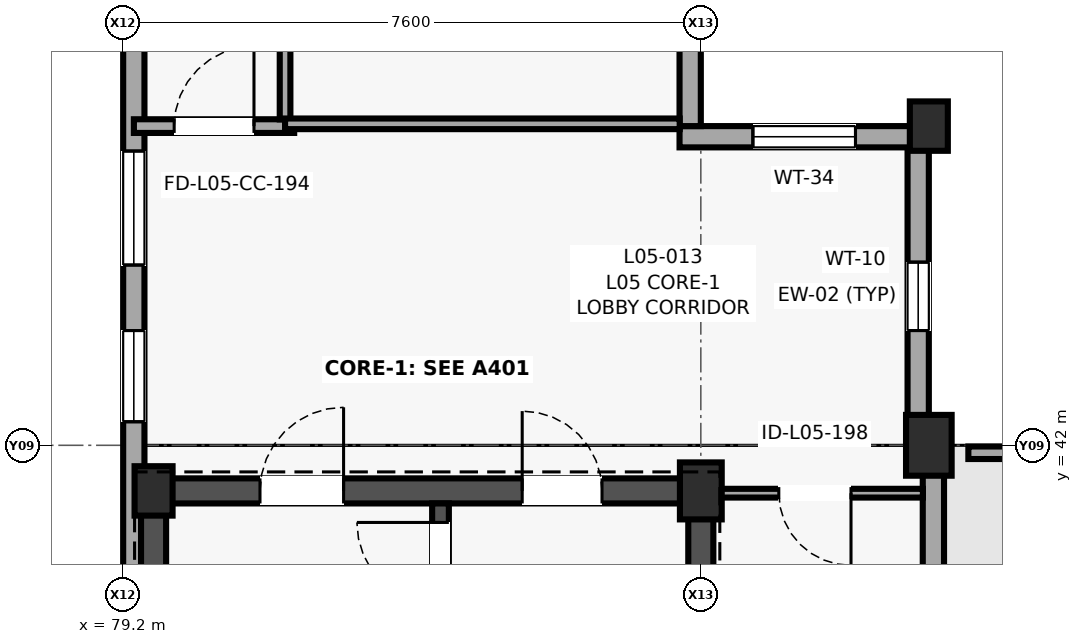
"""IFC4 building model, lengths in metres.
Left out: names, types, materials, properties, quantities, classifications, styles, units other than length and angle.
Written with IfcOpenShell. Run it as: python <this file> out.ifc"""

import sys

from ifc_helpers import new_model, si_unit, direction, frame, frame_2d, origin, origin_2d, place, context, subcontext, project, spatial, polyline, rectangle, outline, extrude, element, fill, save


model = new_model("IFC4")
c1 = context("Model", 3, precision=1e-05, world=origin(), true_north=direction((0.0, 1.0)))
c2 = subcontext(c1, "Body", "Model", "MODEL_VIEW")
j1 = project(units=[si_unit("LENGTHUNIT", "METRE"), si_unit("PLANEANGLEUNIT", "RADIAN")], contexts=[c1])
p1 = place(None, origin())
s1 = spatial("IfcSite", under=j1, at=p1, CompositionType="ELEMENT")
p2 = place(p1, origin())
s2 = spatial("IfcBuilding", under=s1, at=p2, CompositionType="ELEMENT")
p3 = place(p2, frame((0.0, 0.0, 20.2)))
s3 = spatial("IfcBuildingStorey", under=s2, at=p3, CompositionType="ELEMENT", Elevation=20.2)
p4 = place(p3, frame((79.6, 41.4, 0.0), z_axis=(0.0, 0.0, 1.0), x_axis=(1.0, 0.0, 0.0)))
e1 = element("IfcColumn", 1, at=p4, inside=s3, PredefinedType="COLUMN", context=c2, shape_type="SweptSolid", body=[
    extrude(rectangle(XDim=0.5, YDim=0.65, at=origin_2d()), origin(), (0.0, 0.0, 1.0), 4.0),
])
p5 = place(p3, frame((86.8, 41.4, 0.0), z_axis=(0.0, 0.0, 1.0), x_axis=(1.0, 0.0, 0.0)))
e2 = element("IfcColumn", 2, at=p5, inside=s3, PredefinedType="COLUMN", context=c2, shape_type="SweptSolid", body=[
    extrude(rectangle(XDim=0.55, YDim=0.75, at=origin_2d()), origin(), (0.0, 0.0, 1.0), 4.0),
])
p6 = place(p3, frame((89.8, 42.0, 0.0), z_axis=(0.0, 0.0, 1.0), x_axis=(1.0, 0.0, 0.0)))
e3 = element("IfcColumn", 3, at=p6, inside=s3, PredefinedType="COLUMN", context=c2, shape_type="SweptSolid", body=[
    extrude(rectangle(XDim=0.6, YDim=0.8, at=origin_2d()), origin(), (0.0, 0.0, 1.0), 4.0),
])
p7 = place(p3, frame((89.8, 46.2, 0.0), z_axis=(0.0, 0.0, 1.0), x_axis=(1.0, 0.0, 0.0)))
e4 = element("IfcColumn", 4, at=p7, inside=s3, PredefinedType="COLUMN", context=c2, shape_type="SweptSolid", body=[
    extrude(rectangle(XDim=0.5, YDim=0.65, at=origin_2d()), origin(), (0.0, 0.0, 1.0), 4.0),
])
p8 = place(p3, frame((89.66, 42.0, 0.0), z_axis=(0.0, 0.0, 1.0), x_axis=(0.0, 1.0, 0.0)))
e5 = element("IfcWall", 5, at=p8, inside=s3, PredefinedType="SOLIDWALL", context=c2, shape_type="SweptSolid", body=[
    extrude(rectangle(XDim=3.92, YDim=0.28, at=frame_2d((1.96, 0.0))), origin(), (0.0, 0.0, 1.0), 3.255),
])
p9 = place(p8, frame((1.51, 0.0, 1.05)))
e6 = element("IfcOpeningElement", 6, at=p9, cuts=e5, PredefinedType="OPENING", context=c2, shape_type="SweptSolid", body=[
    extrude(rectangle(XDim=0.9, YDim=0.9, at=frame_2d((0.45, 0.45))), frame((0.0, 0.15, 0.0), z_axis=(0.0, -1.0, 0.0), x_axis=(1.0, 0.0, 0.0)), (0.0, 0.0, 1.0), 0.3),
])
p10 = place(p3, frame((89.8, 46.06, 0.0), z_axis=(0.0, 0.0, 1.0), x_axis=(-1.0, 0.0, 0.0)))
e7 = element("IfcWall", 7, at=p10, inside=s3, PredefinedType="SOLIDWALL", context=c2, shape_type="SweptSolid", body=[
    extrude(rectangle(XDim=3.28, YDim=0.28, at=frame_2d((1.64, 0.0))), origin(), (0.0, 0.0, 1.0), 3.78),
])
p11 = place(p10, frame((0.965, 0.0, 1.05)))
e8 = element("IfcOpeningElement", 8, at=p11, cuts=e7, PredefinedType="OPENING", context=c2, shape_type="SweptSolid", body=[
    extrude(rectangle(XDim=1.35, YDim=1.2, at=frame_2d((0.675, 0.6))), frame((0.0, 0.15, 0.0), z_axis=(0.0, -1.0, 0.0), x_axis=(1.0, 0.0, 0.0)), (0.0, 0.0, 1.0), 0.3),
])
p12 = place(p3, frame((86.66, 46.2, 0.0), z_axis=(0.0, 0.0, 1.0), x_axis=(0.0, 1.0, 0.0)))
e9 = element("IfcWall", 9, at=p12, inside=s3, PredefinedType="SOLIDWALL", context=c2, shape_type="SweptSolid", body=[
    extrude(rectangle(XDim=11.1, YDim=0.28, at=frame_2d((5.55, 0.0))), origin(), (0.0, 0.0, 1.0), 3.205),
])
p13 = place(p12, frame((1.025, 0.0, 1.05)))
e10 = element("IfcOpeningElement", 10, at=p13, cuts=e9, PredefinedType="OPENING", context=c2, shape_type="SweptSolid", body=[
    extrude(rectangle(XDim=1.65, YDim=1.25, at=frame_2d((0.825, 0.625))), frame((0.0, 0.15, 0.0), z_axis=(0.0, -1.0, 0.0), x_axis=(1.0, 0.0, 0.0)), (0.0, 0.0, 1.0), 0.3),
])
p14 = place(p12, frame((4.625, 0.0, 1.05)))
e11 = element("IfcOpeningElement", 11, at=p14, cuts=e9, PredefinedType="OPENING", context=c2, shape_type="SweptSolid", body=[
    extrude(rectangle(XDim=1.85, YDim=1.4, at=frame_2d((0.925, 0.7))), frame((0.0, 0.15, 0.0), z_axis=(0.0, -1.0, 0.0), x_axis=(1.0, 0.0, 0.0)), (0.0, 0.0, 1.0), 0.3),
])
p15 = place(p12, frame((8.5, 0.0, 0.75)))
e12 = element("IfcOpeningElement", 12, at=p15, cuts=e9, PredefinedType="OPENING", context=c2, shape_type="SweptSolid", body=[
    extrude(rectangle(XDim=1.5, YDim=2.2, at=frame_2d((0.75, 1.1))), frame((0.0, 0.15, 0.0), z_axis=(0.0, -1.0, 0.0), x_axis=(1.0, 0.0, 0.0)), (0.0, 0.0, 1.0), 0.3),
])
p16 = place(p3, frame((79.34, 50.84, 0.0), z_axis=(0.0, 0.0, 1.0), x_axis=(0.0, -1.0, 0.0)))
e13 = element("IfcWall", 13, at=p16, inside=s3, PredefinedType="SOLIDWALL", context=c2, shape_type="SweptSolid", body=[
    extrude(rectangle(XDim=17.56, YDim=0.28, at=frame_2d((8.78, 0.0))), origin(), (0.0, 0.0, 1.0), 3.155),
])
p17 = place(p16, frame((2.056, 0.0, 0.75)))
e14 = element("IfcOpeningElement", 14, at=p17, cuts=e13, PredefinedType="OPENING", context=c2, shape_type="SweptSolid", body=[
    extrude(rectangle(XDim=1.1, YDim=2.1, at=frame_2d((0.55, 1.05))), frame((0.0, 0.15, 0.0), z_axis=(0.0, -1.0, 0.0), x_axis=(1.0, 0.0, 0.0)), (0.0, 0.0, 1.0), 0.3),
])
p18 = place(p16, frame((4.968, 0.0, 0.85)))
e15 = element("IfcOpeningElement", 15, at=p18, cuts=e13, PredefinedType="OPENING", context=c2, shape_type="SweptSolid", body=[
    extrude(rectangle(XDim=1.5, YDim=1.65, at=frame_2d((0.75, 0.825))), frame((0.0, 0.15, 0.0), z_axis=(0.0, -1.0, 0.0), x_axis=(1.0, 0.0, 0.0)), (0.0, 0.0, 1.0), 0.3),
])
p19 = place(p16, frame((7.33, 0.0, 0.85)))
e16 = element("IfcOpeningElement", 16, at=p19, cuts=e13, PredefinedType="OPENING", context=c2, shape_type="SweptSolid", body=[
    extrude(rectangle(XDim=1.2, YDim=1.65, at=frame_2d((0.6, 0.825))), frame((0.0, 0.15, 0.0), z_axis=(0.0, -1.0, 0.0), x_axis=(1.0, 0.0, 0.0)), (0.0, 0.0, 1.0), 0.3),
])
p20 = place(p3, frame((89.86, 35.522, 0.0), z_axis=(0.0, 0.0, 1.0), x_axis=(0.0, 1.0, 0.0)))
e17 = element("IfcWall", 17, at=p20, inside=s3, PredefinedType="SOLIDWALL", context=c2, shape_type="SweptSolid", body=[
    extrude(rectangle(XDim=6.198, YDim=0.28, at=frame_2d((3.099, 0.0))), origin(), (0.0, 0.0, 1.0), 3.78),
])
p21 = place(p20, frame((2.149, 0.0, 0.85)))
e18 = element("IfcOpeningElement", 18, at=p21, cuts=e17, PredefinedType="OPENING", context=c2, shape_type="SweptSolid", body=[
    extrude(rectangle(XDim=1.9, YDim=1.65, at=frame_2d((0.95, 0.825))), frame((0.0, 0.15, 0.0), z_axis=(0.0, -1.0, 0.0), x_axis=(1.0, 0.0, 0.0)), (0.0, 0.0, 1.0), 0.3),
])
p22 = place(p3, frame((93.999, 41.902, 0.0), z_axis=(0.0, 0.0, 1.0), x_axis=(-1.0, 0.0, 0.0)))
e19 = element("IfcWall", 19, at=p22, inside=s3, PredefinedType="PARAPET", context=c2, shape_type="SweptSolid", body=[
    extrude(rectangle(XDim=3.679, YDim=0.165, at=frame_2d((1.839, 0.0))), origin(), (0.0, 0.0, 1.0), 1.12),
])
p23 = place(p3, frame((89.902, 35.522, 4.0), z_axis=(0.0, 0.0, 1.0), x_axis=(0.0, 1.0, 0.0)))
e20 = element("IfcWall", 20, at=p23, inside=s3, PredefinedType="PARAPET", context=c2, shape_type="SweptSolid", body=[
    extrude(rectangle(XDim=6.283, YDim=0.195, at=frame_2d((3.142, 0.0))), origin(), (0.0, 0.0, 1.0), 1.12),
])
p24 = place(p3, frame((89.999, 41.902, 4.0), z_axis=(0.0, 0.0, 1.0), x_axis=(-1.0, 0.0, 0.0)))
e21 = element("IfcWall", 21, at=p24, inside=s3, PredefinedType="PARAPET", context=c2, shape_type="SweptSolid", body=[
    extrude(outline(polyline([(0.0, 0.0), (10.798, 0.0), (10.798, 1.12), (7.343, 1.12), (7.293, 1.46), (3.505, 1.46), (3.455, 1.12), (0.0, 1.12), (0.0, 0.0)])), frame((0.0, 0.098, 0.0), z_axis=(0.0, -1.0, 0.0), x_axis=(1.0, 0.0, 0.0)), (0.0, 0.0, 1.0), 0.195),
])
p25 = place(p3, frame((79.298, 41.805, 4.0), z_axis=(0.0, 0.0, 1.0), x_axis=(0.0, -1.0, 0.0)))
e22 = element("IfcWall", 22, at=p25, inside=s3, PredefinedType="PARAPET", context=c2, shape_type="SweptSolid", body=[
    extrude(rectangle(XDim=8.61, YDim=0.195, at=frame_2d((4.305, 0.0))), origin(), (0.0, 0.0, 1.0), 1.12),
])
p26 = place(p3, frame((89.702, 42.195, 4.0), z_axis=(0.0, 0.0, 1.0), x_axis=(0.0, 1.0, 0.0)))
e23 = element("IfcWall", 23, at=p26, inside=s3, PredefinedType="PARAPET", context=c2, shape_type="SweptSolid", body=[
    extrude(rectangle(XDim=3.81, YDim=0.165, at=frame_2d((1.905, 0.0))), origin(), (0.0, 0.0, 1.0), 1.12),
])
p27 = place(p3, frame((89.799, 46.102, 4.0), z_axis=(0.0, 0.0, 1.0), x_axis=(-1.0, 0.0, 0.0)))
e24 = element("IfcWall", 24, at=p27, inside=s3, PredefinedType="PARAPET", context=c2, shape_type="SweptSolid", body=[
    extrude(rectangle(XDim=3.194, YDim=0.165, at=frame_2d((1.597, 0.0))), origin(), (0.0, 0.0, 1.0), 1.12),
])
p28 = place(p3, frame((86.702, 46.199, 4.0), z_axis=(0.0, 0.0, 1.0), x_axis=(0.0, 1.0, 0.0)))
e25 = element("IfcWall", 25, at=p28, inside=s3, PredefinedType="PARAPET", context=c2, shape_type="SweptSolid", body=[
    extrude(outline(polyline([(0.0, 0.0), (22.006, 0.0), (22.006, 1.12), (14.964, 1.12), (14.914, 1.46), (7.092, 1.46), (7.042, 1.12), (0.0, 1.12), (0.0, 0.0)])), frame((0.0, 0.098, 0.0), z_axis=(0.0, -1.0, 0.0), x_axis=(1.0, 0.0, 0.0)), (0.0, 0.0, 1.0), 0.195),
])
p29 = place(p3, frame((79.298, 68.205, 4.0), z_axis=(0.0, 0.0, 1.0), x_axis=(0.0, -1.0, 0.0)))
e26 = element("IfcWall", 26, at=p29, inside=s3, PredefinedType="PARAPET", context=c2, shape_type="SweptSolid", body=[
    extrude(outline(polyline([(0.0, 0.0), (26.01, 0.0), (26.01, 1.12), (17.687, 1.12), (17.637, 1.46), (8.373, 1.46), (8.323, 1.12), (0.0, 1.12), (0.0, 0.0)])), frame((0.0, 0.098, 0.0), z_axis=(0.0, -1.0, 0.0), x_axis=(1.0, 0.0, 0.0)), (0.0, 0.0, 1.0), 0.195),
])
p30 = place(p3, frame((79.201, 42.098, 4.0), z_axis=(0.0, 0.0, 1.0), x_axis=(1.0, 0.0, 0.0)))
e27 = element("IfcWall", 27, at=p30, inside=s3, PredefinedType="PARAPET", context=c2, shape_type="SweptSolid", body=[
    extrude(outline(polyline([(0.0, 0.0), (10.598, 0.0), (10.598, 1.12), (7.207, 1.12), (7.157, 1.46), (3.441, 1.46), (3.391, 1.12), (0.0, 1.12), (0.0, 0.0)])), frame((0.0, 0.098, 0.0), z_axis=(0.0, -1.0, 0.0), x_axis=(1.0, 0.0, 0.0)), (0.0, 0.0, 1.0), 0.195),
])
p31 = place(p3, frame((79.435, 41.4, 0.0), z_axis=(0.0, 0.0, 1.0), x_axis=(1.0, 0.0, 0.0)))
e28 = element("IfcWall", 28, at=p31, inside=s3, PredefinedType="SHEAR", context=c2, shape_type="SweptSolid", body=[
    extrude(rectangle(XDim=7.53, YDim=0.33, at=frame_2d((3.765, 0.0))), origin(), (0.0, 0.0, 1.0), 4.0),
])
p32 = place(p31, frame((5.015, 0.0, 0.0)))
e29 = element("IfcOpeningElement", 29, at=p32, cuts=e28, PredefinedType="OPENING", context=c2, shape_type="SweptSolid", body=[
    extrude(rectangle(XDim=1.05, YDim=2.15, at=frame_2d((0.525, 1.075))), frame((0.0, 0.175, 0.0), z_axis=(0.0, -1.0, 0.0), x_axis=(1.0, 0.0, 0.0)), (0.0, 0.0, 1.0), 0.35),
])
p33 = place(p31, frame((1.565, 0.0, 0.0)))
e30 = element("IfcOpeningElement", 30, at=p33, cuts=e28, PredefinedType="OPENING", context=c2, shape_type="SweptSolid", body=[
    extrude(rectangle(XDim=1.1, YDim=2.15, at=frame_2d((0.55, 1.075))), frame((0.0, 0.175, 0.0), z_axis=(0.0, -1.0, 0.0), x_axis=(1.0, 0.0, 0.0)), (0.0, 0.0, 1.0), 0.35),
])
for number, where, z_axis, x_axis in (
    (31, (79.6, 33.765, 0.0), (0.0, 0.0, 1.0), (0.0, 1.0, 0.0)),
    (32, (86.8, 33.765, 0.0), (0.0, 0.0, 1.0), (0.0, 1.0, 0.0)),
):
    element("IfcWall", number, at=place(p3, frame(where, z_axis=z_axis, x_axis=x_axis)), inside=s3, PredefinedType="SHEAR", context=c2, shape_type="SweptSolid", body=[
        extrude(rectangle(XDim=7.47, YDim=0.33, at=frame_2d((3.735, 0.0))), origin(), (0.0, 0.0, 1.0), 4.0),
    ])
p34 = place(p3, frame((83.375, 33.765, 0.0), z_axis=(0.0, 0.0, 1.0), x_axis=(0.0, 1.0, 0.0)))
e33 = element("IfcWall", 33, at=p34, inside=s3, PredefinedType="SHEAR", context=c2, shape_type="SweptSolid", body=[
    extrude(rectangle(XDim=7.47, YDim=0.22, at=frame_2d((3.735, 0.0))), origin(), (0.0, 0.0, 1.0), 4.0),
])
p35 = place(p34, frame((6.12, 0.0, 0.0)))
e34 = element("IfcOpeningElement", 34, at=p35, cuts=e33, PredefinedType="OPENING", context=c2, shape_type="SweptSolid", body=[
    extrude(rectangle(XDim=1.1, YDim=2.15, at=frame_2d((0.55, 1.075))), frame((0.0, 0.12, 0.0), z_axis=(0.0, -1.0, 0.0), x_axis=(1.0, 0.0, 0.0)), (0.0, 0.0, 1.0), 0.24),
])
p36 = place(p3, frame((79.341, 46.2, 0.0), z_axis=(0.0, 0.0, 1.0), x_axis=(1.0, 0.0, 0.0)))
e35 = element("IfcWall", 35, at=p36, inside=s3, PredefinedType="PARTITIONING", context=c2, shape_type="SweptSolid", body=[
    extrude(rectangle(XDim=2.109, YDim=0.18, at=frame_2d((1.054, 0.0))), origin(), (0.0, 0.0, 1.0), 3.78),
])
p37 = place(p36, frame((0.53, 0.0, 0.0)))
e36 = element("IfcOpeningElement", 36, at=p37, cuts=e35, PredefinedType="OPENING", context=c2, shape_type="SweptSolid", body=[
    extrude(rectangle(XDim=1.05, YDim=2.15, at=frame_2d((0.525, 1.075))), frame((0.0, 0.1, 0.0), z_axis=(0.0, -1.0, 0.0), x_axis=(1.0, 0.0, 0.0)), (0.0, 0.0, 1.0), 0.2),
])
p38 = place(p3, frame((89.722, 41.37, 0.0), z_axis=(0.0, 0.0, 1.0), x_axis=(-1.0, 0.0, 0.0)))
e37 = element("IfcWall", 37, at=p38, inside=s3, PredefinedType="PARTITIONING", context=c2, shape_type="SweptSolid", body=[
    extrude(rectangle(XDim=2.842, YDim=0.115, at=frame_2d((1.421, 0.0))), origin(), (0.0, 0.0, 1.0), 3.755),
])
p39 = place(p38, frame((0.946, 0.0, 0.0)))
e38 = element("IfcOpeningElement", 38, at=p39, cuts=e37, PredefinedType="OPENING", context=c2, shape_type="SweptSolid", body=[
    extrude(rectangle(XDim=0.95, YDim=2.05, at=frame_2d((0.475, 1.025))), frame((0.0, 0.067, 0.0), z_axis=(0.0, -1.0, 0.0), x_axis=(1.0, 0.0, 0.0)), (0.0, 0.0, 1.0), 0.135),
])
p40 = place(p3, frame((81.33, 53.502, 0.0), z_axis=(0.0, 0.0, 1.0), x_axis=(0.0, -1.0, 0.0)))
e39 = element("IfcWall", 39, at=p40, inside=s3, PredefinedType="PARTITIONING", context=c2, shape_type="SweptSolid", body=[
    extrude(rectangle(XDim=7.214, YDim=0.14, at=frame_2d((3.607, 0.0))), origin(), (0.0, 0.0, 1.0), 3.755),
])
p41 = place(p40, frame((3.057, 0.0, 0.0)))
e40 = element("IfcOpeningElement", 40, at=p41, cuts=e39, PredefinedType="OPENING", context=c2, shape_type="SweptSolid", body=[
    extrude(rectangle(XDim=1.1, YDim=2.1, at=frame_2d((0.55, 1.05))), frame((0.0, 0.08, 0.0), z_axis=(0.0, -1.0, 0.0), x_axis=(1.0, 0.0, 0.0)), (0.0, 0.0, 1.0), 0.16),
])
p42 = place(p40, frame((4.857, 0.0, 1.05)))
e41 = element("IfcOpeningElement", 41, at=p42, cuts=e39, PredefinedType="OPENING", context=c2, shape_type="SweptSolid", body=[
    extrude(rectangle(XDim=1.4, YDim=1.05, at=frame_2d((0.7, 0.525))), frame((0.0, 0.08, 0.0), z_axis=(0.0, -1.0, 0.0), x_axis=(1.0, 0.0, 0.0)), (0.0, 0.0, 1.0), 0.16),
])
p43 = place(p3, frame((81.33, 46.23, 0.0), z_axis=(0.0, 0.0, 1.0), x_axis=(1.0, 0.0, 0.0)))
e42 = element("IfcWall", 42, at=p43, inside=s3, PredefinedType="PARTITIONING", context=c2, shape_type="SweptSolid", body=[
    extrude(rectangle(XDim=5.192, YDim=0.14, at=frame_2d((2.596, 0.0))), origin(), (0.0, 0.0, 1.0), 3.755),
])
p44 = place(p9, origin())
e43 = element("IfcWindow", 43, at=p44, inside=s3, PartitioningType="SINGLE_PANEL", PredefinedType="WINDOW", context=c2, shape_type="SweptSolid", body=[
    extrude(rectangle(XDim=0.9, YDim=0.9, at=frame_2d((0.45, 0.45))), frame((0.0, 0.03, 0.0), z_axis=(0.0, -1.0, 0.0), x_axis=(1.0, 0.0, 0.0)), (0.0, 0.0, 1.0), 0.06),
])
fill(e6, e43)
p45 = place(p11, origin())
e44 = element("IfcWindow", 44, at=p45, inside=s3, PartitioningType="SINGLE_PANEL", PredefinedType="WINDOW", context=c2, shape_type="SweptSolid", body=[
    extrude(rectangle(XDim=1.35, YDim=1.2, at=frame_2d((0.675, 0.6))), frame((0.0, 0.03, 0.0), z_axis=(0.0, -1.0, 0.0), x_axis=(1.0, 0.0, 0.0)), (0.0, 0.0, 1.0), 0.06),
])
fill(e8, e44)
p46 = place(p18, origin())
e45 = element("IfcWindow", 45, at=p46, inside=s3, PartitioningType="SINGLE_PANEL", PredefinedType="WINDOW", context=c2, shape_type="SweptSolid", body=[
    extrude(rectangle(XDim=1.5, YDim=1.65, at=frame_2d((0.75, 0.825))), frame((0.0, 0.03, 0.0), z_axis=(0.0, -1.0, 0.0), x_axis=(1.0, 0.0, 0.0)), (0.0, 0.0, 1.0), 0.06),
])
fill(e15, e45)
p47 = place(p19, origin())
e46 = element("IfcWindow", 46, at=p47, inside=s3, PartitioningType="SINGLE_PANEL", PredefinedType="WINDOW", context=c2, shape_type="SweptSolid", body=[
    extrude(rectangle(XDim=1.2, YDim=1.65, at=frame_2d((0.6, 0.825))), frame((0.0, 0.03, 0.0), z_axis=(0.0, -1.0, 0.0), x_axis=(1.0, 0.0, 0.0)), (0.0, 0.0, 1.0), 0.06),
])
fill(e16, e46)
p48 = place(p35, origin())
e47 = element("IfcDoor", 47, at=p48, inside=s3, OperationType="SINGLE_SWING_RIGHT", PredefinedType="DOOR", context=c2, shape_type="SweptSolid", body=[
    extrude(rectangle(XDim=1.1, YDim=2.15, at=frame_2d((0.55, 1.075))), frame((0.0, 0.025, 0.0), z_axis=(0.0, -1.0, 0.0), x_axis=(1.0, 0.0, 0.0)), (0.0, 0.0, 1.0), 0.05),
])
fill(e34, e47)
p49 = place(p32, origin())
e48 = element("IfcDoor", 48, at=p49, inside=s3, OperationType="SINGLE_SWING_LEFT", PredefinedType="DOOR", context=c2, shape_type="SweptSolid", body=[
    extrude(rectangle(XDim=1.05, YDim=2.15, at=frame_2d((0.525, 1.075))), frame((0.0, 0.025, 0.0), z_axis=(0.0, -1.0, 0.0), x_axis=(1.0, 0.0, 0.0)), (0.0, 0.0, 1.0), 0.05),
])
fill(e29, e48)
p50 = place(p33, origin())
e49 = element("IfcDoor", 49, at=p50, inside=s3, OperationType="SINGLE_SWING_RIGHT", PredefinedType="DOOR", context=c2, shape_type="SweptSolid", body=[
    extrude(rectangle(XDim=1.1, YDim=2.15, at=frame_2d((0.55, 1.075))), frame((0.0, 0.025, 0.0), z_axis=(0.0, -1.0, 0.0), x_axis=(1.0, 0.0, 0.0)), (0.0, 0.0, 1.0), 0.05),
])
fill(e30, e49)
p51 = place(p37, origin())
e50 = element("IfcDoor", 50, at=p51, inside=s3, OperationType="SINGLE_SWING_RIGHT", PredefinedType="DOOR", context=c2, shape_type="SweptSolid", body=[
    extrude(rectangle(XDim=1.05, YDim=2.15, at=frame_2d((0.525, 1.075))), frame((0.0, 0.025, 0.0), z_axis=(0.0, -1.0, 0.0), x_axis=(1.0, 0.0, 0.0)), (0.0, 0.0, 1.0), 0.05),
])
fill(e36, e50)
p52 = place(p39, origin())
e51 = element("IfcDoor", 51, at=p52, inside=s3, OperationType="SINGLE_SWING_LEFT", PredefinedType="DOOR", context=c2, shape_type="SweptSolid", body=[
    extrude(rectangle(XDim=0.95, YDim=2.05, at=frame_2d((0.475, 1.025))), frame((0.0, 0.025, 0.0), z_axis=(0.0, -1.0, 0.0), x_axis=(1.0, 0.0, 0.0)), (0.0, 0.0, 1.0), 0.05),
])
fill(e38, e51)
save(model, sys.argv[1])
